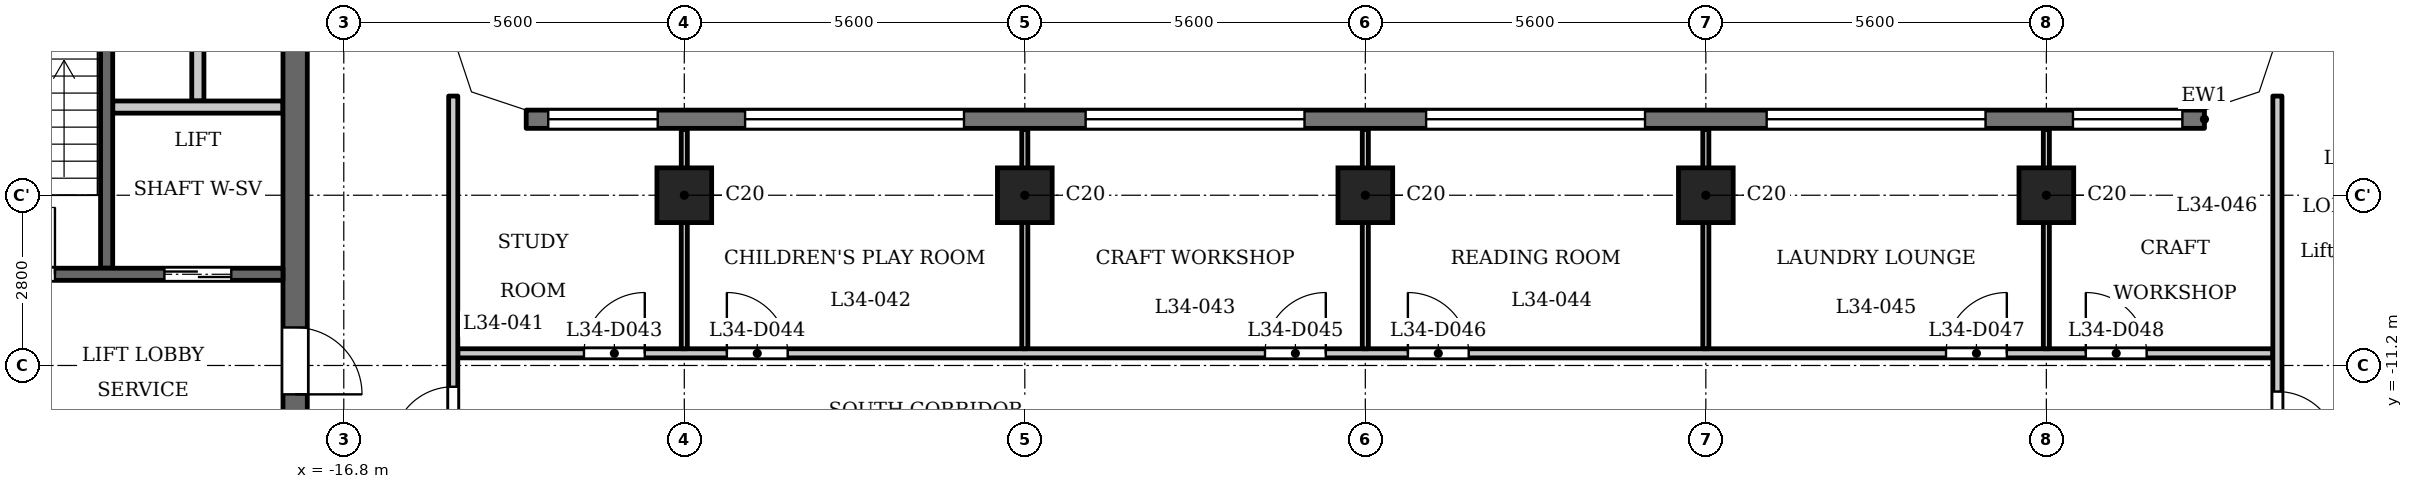
"""IFC4 building model, lengths in metres.
Left out: names, types, materials, properties, quantities, classifications, styles, units other than length and angle.
Written with IfcOpenShell. Run it as: python <this file> out.ifc"""

import sys

from ifc_helpers import new_model, si_unit, direction, frame, frame_2d, origin, origin_2d, place, context, subcontext, project, spatial, polyline, rectangle, outline, extrude, element, fill, save


model = new_model("IFC4")
c1 = context("Model", 3, precision=1e-05, world=origin(), true_north=direction((0.0, 1.0)))
c2 = subcontext(c1, "Body", "Model", "MODEL_VIEW")
j1 = project(units=[si_unit("LENGTHUNIT", "METRE"), si_unit("PLANEANGLEUNIT", "RADIAN")], contexts=[c1])
p1 = place(None, origin())
s1 = spatial("IfcSite", under=j1, at=p1, CompositionType="ELEMENT")
p2 = place(p1, origin())
s2 = spatial("IfcBuilding", under=s1, at=p2, CompositionType="ELEMENT")
p3 = place(p2, frame((0.0, 0.0, 136.1)))
s3 = spatial("IfcBuildingStorey", under=s2, at=p3, CompositionType="ELEMENT", Elevation=136.1)
for number, where, z_axis, x_axis in (
    (1, (-11.2, -8.4, 0.0), (0.0, 0.0, 1.0), (1.0, 0.0, 0.0)),
    (2, (-5.6, -8.4, 0.0), (0.0, 0.0, 1.0), (1.0, 0.0, 0.0)),
    (3, (0.0, -8.4, 0.0), (0.0, 0.0, 1.0), (1.0, 0.0, 0.0)),
    (4, (5.6, -8.4, 0.0), (0.0, 0.0, 1.0), (1.0, 0.0, 0.0)),
    (5, (11.2, -8.4, 0.0), (0.0, 0.0, 1.0), (1.0, 0.0, 0.0)),
):
    element("IfcColumn", number, at=place(p3, frame(where, z_axis=z_axis, x_axis=x_axis)), inside=s3, PredefinedType="COLUMN", context=c2, shape_type="SweptSolid", body=[
        extrude(rectangle(XDim=0.9, YDim=0.9, at=origin_2d()), origin(), (0.0, 0.0, 1.0), 3.5),
    ])
p4 = place(p3, frame((13.8, -7.15, 0.0), z_axis=(0.0, 0.0, 1.0), x_axis=(-1.0, 0.0, 0.0)))
e6 = element("IfcWall", 6, at=p4, inside=s3, PredefinedType="SOLIDWALL", context=c2, shape_type="SweptSolid", body=[
    extrude(rectangle(XDim=27.6, YDim=0.3, at=frame_2d((13.8, 0.0))), origin(), (0.0, 0.0, 1.0), 3.2),
])
p5 = place(p4, frame((0.363, 0.0, 0.9)))
e7 = element("IfcOpeningElement", 7, at=p5, cuts=e6, PredefinedType="OPENING", context=c2, shape_type="SweptSolid", body=[
    extrude(rectangle(XDim=1.8, YDim=1.25, at=frame_2d((0.9, 0.625))), frame((0.0, 0.16, 0.0), z_axis=(0.0, -1.0, 0.0), x_axis=(1.0, 0.0, 0.0)), (0.0, 0.0, 1.0), 0.32),
])
p6 = place(p4, frame((3.6, 0.0, 1.2)))
e8 = element("IfcOpeningElement", 8, at=p6, cuts=e6, PredefinedType="OPENING", context=c2, shape_type="SweptSolid", body=[
    extrude(rectangle(XDim=3.6, YDim=0.95, at=frame_2d((1.8, 0.475))), frame((0.0, 0.16, 0.0), z_axis=(0.0, -1.0, 0.0), x_axis=(1.0, 0.0, 0.0)), (0.0, 0.0, 1.0), 0.32),
])
p7 = place(p4, frame((9.2, 0.0, 1.2)))
e9 = element("IfcOpeningElement", 9, at=p7, cuts=e6, PredefinedType="OPENING", context=c2, shape_type="SweptSolid", body=[
    extrude(rectangle(XDim=3.6, YDim=0.95, at=frame_2d((1.8, 0.475))), frame((0.0, 0.16, 0.0), z_axis=(0.0, -1.0, 0.0), x_axis=(1.0, 0.0, 0.0)), (0.0, 0.0, 1.0), 0.32),
])
p8 = place(p4, frame((14.8, 0.0, 1.2)))
e10 = element("IfcOpeningElement", 10, at=p8, cuts=e6, PredefinedType="OPENING", context=c2, shape_type="SweptSolid", body=[
    extrude(rectangle(XDim=3.6, YDim=0.95, at=frame_2d((1.8, 0.475))), frame((0.0, 0.16, 0.0), z_axis=(0.0, -1.0, 0.0), x_axis=(1.0, 0.0, 0.0)), (0.0, 0.0, 1.0), 0.32),
])
p9 = place(p4, frame((20.4, 0.0, 1.2)))
e11 = element("IfcOpeningElement", 11, at=p9, cuts=e6, PredefinedType="OPENING", context=c2, shape_type="SweptSolid", body=[
    extrude(rectangle(XDim=3.6, YDim=0.95, at=frame_2d((1.8, 0.475))), frame((0.0, 0.16, 0.0), z_axis=(0.0, -1.0, 0.0), x_axis=(1.0, 0.0, 0.0)), (0.0, 0.0, 1.0), 0.32),
])
p10 = place(p4, frame((25.438, 0.0, 0.9)))
e12 = element("IfcOpeningElement", 12, at=p10, cuts=e6, PredefinedType="OPENING", context=c2, shape_type="SweptSolid", body=[
    extrude(rectangle(XDim=1.8, YDim=1.25, at=frame_2d((0.9, 0.625))), frame((0.0, 0.16, 0.0), z_axis=(0.0, -1.0, 0.0), x_axis=(1.0, 0.0, 0.0)), (0.0, 0.0, 1.0), 0.32),
])
p11 = place(p3, frame((-20.7, -9.6, 0.0), z_axis=(0.0, 0.0, 1.0), x_axis=(0.0, 1.0, 0.0)))
e13 = element("IfcWall", 13, at=p11, inside=s3, PredefinedType="SHEAR", context=c2, shape_type="SweptSolid", body=[
    extrude(rectangle(XDim=9.75, YDim=0.2, at=frame_2d((4.875, 0.0))), origin(), (0.0, 0.0, 1.0), 3.2),
])
p12 = place(p3, frame((-19.2, -6.85, 0.0), z_axis=(0.0, 0.0, 1.0), x_axis=(0.0, 1.0, 0.0)))
e14 = element("IfcWall", 14, at=p12, inside=s3, PredefinedType="PARTITIONING", context=c2, shape_type="SweptSolid", body=[
    extrude(rectangle(XDim=7.0, YDim=0.2, at=frame_2d((3.5, 0.0))), origin(), (0.0, 0.0, 1.0), 3.2),
])
p13 = place(p3, frame((-17.6, -12.45, 0.0), z_axis=(0.0, 0.0, 1.0), x_axis=(0.0, 1.0, 0.0)))
e15 = element("IfcWall", 15, at=p13, inside=s3, PredefinedType="SHEAR", context=c2, shape_type="SweptSolid", body=[
    extrude(rectangle(XDim=24.9, YDim=0.4, at=frame_2d((12.45, 0.0))), origin(), (0.0, 0.0, 1.0), 3.2),
])
p14 = place(p13, frame((8.65, 0.0, 0.0)))
e16 = element("IfcOpeningElement", 16, at=p14, cuts=e15, PredefinedType="OPENING", context=c2, shape_type="SweptSolid", body=[
    extrude(rectangle(XDim=0.9, YDim=2.1, at=frame_2d((0.45, 1.05))), frame((0.0, 0.21, 0.0), z_axis=(0.0, -1.0, 0.0), x_axis=(1.0, 0.0, 0.0)), (0.0, 0.0, 1.0), 0.42),
])
p15 = place(p13, frame((15.6, 0.0, 0.0)))
e17 = element("IfcOpeningElement", 17, at=p15, cuts=e15, PredefinedType="OPENING", context=c2, shape_type="SweptSolid", body=[
    extrude(rectangle(XDim=1.1, YDim=2.1, at=frame_2d((0.55, 1.05))), frame((0.0, 0.21, 0.0), z_axis=(0.0, -1.0, 0.0), x_axis=(1.0, 0.0, 0.0)), (0.0, 0.0, 1.0), 0.42),
])
p16 = place(p13, frame((18.0, 0.0, 0.0)))
e18 = element("IfcOpeningElement", 18, at=p16, cuts=e15, PredefinedType="OPENING", context=c2, shape_type="SweptSolid", body=[
    extrude(rectangle(XDim=1.1, YDim=2.1, at=frame_2d((0.55, 1.05))), frame((0.0, 0.21, 0.0), z_axis=(0.0, -1.0, 0.0), x_axis=(1.0, 0.0, 0.0)), (0.0, 0.0, 1.0), 0.42),
])
p17 = place(p13, frame((23.025, 0.0, 0.0)))
e19 = element("IfcOpeningElement", 19, at=p17, cuts=e15, PredefinedType="OPENING", context=c2, shape_type="SweptSolid", body=[
    extrude(rectangle(XDim=1.1, YDim=2.1, at=frame_2d((0.55, 1.05))), frame((0.0, 0.21, 0.0), z_axis=(0.0, -1.0, 0.0), x_axis=(1.0, 0.0, 0.0)), (0.0, 0.0, 1.0), 0.42),
])
p18 = place(p13, frame((0.775, 0.0, 0.0)))
e20 = element("IfcOpeningElement", 20, at=p18, cuts=e15, PredefinedType="OPENING", context=c2, shape_type="SweptSolid", body=[
    extrude(rectangle(XDim=1.1, YDim=2.1, at=frame_2d((0.55, 1.05))), frame((0.0, 0.21, 0.0), z_axis=(0.0, -1.0, 0.0), x_axis=(1.0, 0.0, 0.0)), (0.0, 0.0, 1.0), 0.42),
])
p19 = place(p13, frame((12.925, 0.0, 0.0)))
e21 = element("IfcOpeningElement", 21, at=p19, cuts=e15, PredefinedType="OPENING", context=c2, shape_type="SweptSolid", body=[
    extrude(rectangle(XDim=1.8, YDim=2.1, at=frame_2d((0.9, 1.05))), frame((0.0, 0.21, 0.0), z_axis=(0.0, -1.0, 0.0), x_axis=(1.0, 0.0, 0.0)), (0.0, 0.0, 1.0), 0.42),
])
p20 = place(p3, frame((-17.8, -9.7, 0.0), z_axis=(0.0, 0.0, 1.0), x_axis=(-1.0, 0.0, 0.0)))
e22 = element("IfcWall", 22, at=p20, inside=s3, PredefinedType="SHEAR", context=c2, shape_type="SweptSolid", body=[
    extrude(rectangle(XDim=8.45, YDim=0.2, at=frame_2d((4.225, 0.0))), origin(), (0.0, 0.0, 1.0), 3.2),
])
p21 = place(p20, frame((0.85, 0.0, 0.0)))
e23 = element("IfcOpeningElement", 23, at=p21, cuts=e22, PredefinedType="OPENING", context=c2, shape_type="SweptSolid", body=[
    extrude(rectangle(XDim=1.1, YDim=2.1, at=frame_2d((0.55, 1.05))), frame((0.0, 0.11, 0.0), z_axis=(0.0, -1.0, 0.0), x_axis=(1.0, 0.0, 0.0)), (0.0, 0.0, 1.0), 0.22),
])
p22 = place(p20, frame((3.75, 0.0, 0.0)))
e24 = element("IfcOpeningElement", 24, at=p22, cuts=e22, PredefinedType="OPENING", context=c2, shape_type="SweptSolid", body=[
    extrude(rectangle(XDim=1.1, YDim=2.1, at=frame_2d((0.55, 1.05))), frame((0.0, 0.11, 0.0), z_axis=(0.0, -1.0, 0.0), x_axis=(1.0, 0.0, 0.0)), (0.0, 0.0, 1.0), 0.22),
])
p23 = place(p3, frame((-17.8, -6.95, 0.0), z_axis=(0.0, 0.0, 1.0), x_axis=(-1.0, 0.0, 0.0)))
e25 = element("IfcWall", 25, at=p23, inside=s3, PredefinedType="PARTITIONING", context=c2, shape_type="SweptSolid", body=[
    extrude(rectangle(XDim=2.8, YDim=0.2, at=frame_2d((1.4, 0.0))), origin(), (0.0, 0.0, 1.0), 3.2),
])
p24 = place(p3, frame((-14.925, -11.0, 0.0), z_axis=(0.0, 0.0, 1.0), x_axis=(1.0, 0.0, 0.0)))
e26 = element("IfcWall", 26, at=p24, inside=s3, PredefinedType="PARTITIONING", context=c2, shape_type="SweptSolid", body=[
    extrude(rectangle(XDim=29.85, YDim=0.15, at=frame_2d((14.925, 0.0))), origin(), (0.0, 0.0, 1.0), 3.2),
])
p25 = place(p24, frame((2.075, 0.0, 0.0)))
e27 = element("IfcOpeningElement", 27, at=p25, cuts=e26, PredefinedType="OPENING", context=c2, shape_type="SweptSolid", body=[
    extrude(rectangle(XDim=1.0, YDim=2.1, at=frame_2d((0.5, 1.05))), frame((0.0, 0.085, 0.0), z_axis=(0.0, -1.0, 0.0), x_axis=(1.0, 0.0, 0.0)), (0.0, 0.0, 1.0), 0.17),
])
p26 = place(p24, frame((4.425, 0.0, 0.0)))
e28 = element("IfcOpeningElement", 28, at=p26, cuts=e26, PredefinedType="OPENING", context=c2, shape_type="SweptSolid", body=[
    extrude(rectangle(XDim=1.0, YDim=2.1, at=frame_2d((0.5, 1.05))), frame((0.0, 0.085, 0.0), z_axis=(0.0, -1.0, 0.0), x_axis=(1.0, 0.0, 0.0)), (0.0, 0.0, 1.0), 0.17),
])
p27 = place(p24, frame((13.275, 0.0, 0.0)))
e29 = element("IfcOpeningElement", 29, at=p27, cuts=e26, PredefinedType="OPENING", context=c2, shape_type="SweptSolid", body=[
    extrude(rectangle(XDim=1.0, YDim=2.1, at=frame_2d((0.5, 1.05))), frame((0.0, 0.085, 0.0), z_axis=(0.0, -1.0, 0.0), x_axis=(1.0, 0.0, 0.0)), (0.0, 0.0, 1.0), 0.17),
])
p28 = place(p24, frame((15.625, 0.0, 0.0)))
e30 = element("IfcOpeningElement", 30, at=p28, cuts=e26, PredefinedType="OPENING", context=c2, shape_type="SweptSolid", body=[
    extrude(rectangle(XDim=1.0, YDim=2.1, at=frame_2d((0.5, 1.05))), frame((0.0, 0.085, 0.0), z_axis=(0.0, -1.0, 0.0), x_axis=(1.0, 0.0, 0.0)), (0.0, 0.0, 1.0), 0.17),
])
p29 = place(p24, frame((24.475, 0.0, 0.0)))
e31 = element("IfcOpeningElement", 31, at=p29, cuts=e26, PredefinedType="OPENING", context=c2, shape_type="SweptSolid", body=[
    extrude(rectangle(XDim=1.0, YDim=2.1, at=frame_2d((0.5, 1.05))), frame((0.0, 0.085, 0.0), z_axis=(0.0, -1.0, 0.0), x_axis=(1.0, 0.0, 0.0)), (0.0, 0.0, 1.0), 0.17),
])
p30 = place(p24, frame((26.774, 0.0, 0.0)))
e32 = element("IfcOpeningElement", 32, at=p30, cuts=e26, PredefinedType="OPENING", context=c2, shape_type="SweptSolid", body=[
    extrude(rectangle(XDim=1.0, YDim=2.1, at=frame_2d((0.5, 1.05))), frame((0.0, 0.085, 0.0), z_axis=(0.0, -1.0, 0.0), x_axis=(1.0, 0.0, 0.0)), (0.0, 0.0, 1.0), 0.17),
])
p31 = place(p3, frame((-15.0, -13.125, 0.0), z_axis=(0.0, 0.0, 1.0), x_axis=(0.0, 1.0, 0.0)))
e33 = element("IfcWall", 33, at=p31, inside=s3, PredefinedType="PARTITIONING", context=c2, shape_type="SweptSolid", body=[
    extrude(rectangle(XDim=6.356, YDim=0.15, at=frame_2d((3.178, 0.0))), origin(), (0.0, 0.0, 1.0), 3.2),
])
p32 = place(p31, frame((0.575, 0.0, 0.0)))
e34 = element("IfcOpeningElement", 34, at=p32, cuts=e33, PredefinedType="OPENING", context=c2, shape_type="SweptSolid", body=[
    extrude(rectangle(XDim=1.0, YDim=2.1, at=frame_2d((0.5, 1.05))), frame((0.0, 0.085, 0.0), z_axis=(0.0, -1.0, 0.0), x_axis=(1.0, 0.0, 0.0)), (0.0, 0.0, 1.0), 0.17),
])
for number, where, z_axis, x_axis in (
    (35, (-11.2, -10.925, 0.0), (0.0, 0.0, 1.0), (0.0, 1.0, 0.0)),
    (36, (-5.6, -10.925, 0.0), (0.0, 0.0, 1.0), (0.0, 1.0, 0.0)),
    (37, (0.0, -10.925, 0.0), (0.0, 0.0, 1.0), (0.0, 1.0, 0.0)),
    (38, (5.6, -10.925, 0.0), (0.0, 0.0, 1.0), (0.0, 1.0, 0.0)),
    (39, (11.2, -10.925, 0.0), (0.0, 0.0, 1.0), (0.0, 1.0, 0.0)),
):
    element("IfcWall", number, at=place(p3, frame(where, z_axis=z_axis, x_axis=x_axis)), inside=s3, PredefinedType="PARTITIONING", context=c2, shape_type="SweptSolid", body=[
        extrude(rectangle(XDim=3.605, YDim=0.1, at=frame_2d((1.802, 0.0))), origin(), (0.0, 0.0, 1.0), 3.2),
    ])
p33 = place(p3, frame((15.0, -13.125, 0.0), z_axis=(0.0, 0.0, 1.0), x_axis=(0.0, 1.0, 0.0)))
e40 = element("IfcWall", 40, at=p33, inside=s3, PredefinedType="PARTITIONING", context=c2, shape_type="SweptSolid", body=[
    extrude(rectangle(XDim=6.356, YDim=0.15, at=frame_2d((3.178, 0.0))), origin(), (0.0, 0.0, 1.0), 3.2),
])
p34 = place(p33, frame((0.496, 0.0, 0.0)))
e41 = element("IfcOpeningElement", 41, at=p34, cuts=e40, PredefinedType="OPENING", context=c2, shape_type="SweptSolid", body=[
    extrude(rectangle(XDim=1.0, YDim=2.1, at=frame_2d((0.5, 1.05))), frame((0.0, 0.085, 0.0), z_axis=(0.0, -1.0, 0.0), x_axis=(1.0, 0.0, 0.0)), (0.0, 0.0, 1.0), 0.17),
])
p35 = place(p3, origin())
e42 = element("IfcWall", 42, at=p35, inside=s3, PredefinedType="SOLIDWALL", context=c2, shape_type="SweptSolid", body=[
    extrude(outline(polyline([(14.937, -6.937), (15.3, -5.849), (15.3, -5.8), (15.0, -5.8), (14.7, -6.7), (13.8, -7.0), (13.8, -7.3), (13.849, -7.3), (14.937, -6.937)])), origin(), (0.0, 0.0, 1.0), 3.2),
])
e43 = element("IfcWall", 43, at=p35, inside=s3, PredefinedType="SOLIDWALL", context=c2, shape_type="SweptSolid", body=[
    extrude(outline(polyline([(-14.937, -6.937), (-13.849, -7.3), (-13.8, -7.3), (-13.8, -7.0), (-14.7, -6.7), (-15.0, -5.8), (-15.3, -5.8), (-15.3, -5.849), (-14.937, -6.937)])), origin(), (0.0, 0.0, 1.0), 3.2),
])
p36 = place(p21, origin())
e44 = element("IfcDoor", 44, at=p36, inside=s3, OperationType="DOUBLE_DOOR_SLIDING", PredefinedType="DOOR", context=c2, shape_type="SweptSolid", body=[
    extrude(rectangle(XDim=1.1, YDim=2.1, at=frame_2d((0.55, 1.05))), frame((0.0, 0.025, 0.0), z_axis=(0.0, -1.0, 0.0), x_axis=(1.0, 0.0, 0.0)), (0.0, 0.0, 1.0), 0.05),
])
fill(e23, e44)
p37 = place(p18, origin())
e45 = element("IfcDoor", 45, at=p37, inside=s3, OperationType="SINGLE_SWING_LEFT", PredefinedType="DOOR", context=c2, shape_type="SweptSolid", body=[
    extrude(rectangle(XDim=1.1, YDim=2.1, at=frame_2d((0.55, 1.05))), frame((0.0, 0.025, 0.0), z_axis=(0.0, -1.0, 0.0), x_axis=(1.0, 0.0, 0.0)), (0.0, 0.0, 1.0), 0.05),
])
fill(e20, e45)
p38 = place(p22, origin())
e46 = element("IfcDoor", 46, at=p38, inside=s3, OperationType="SINGLE_SWING_LEFT", PredefinedType="DOOR", context=c2, shape_type="SweptSolid", body=[
    extrude(rectangle(XDim=1.1, YDim=2.1, at=frame_2d((0.55, 1.05))), frame((0.0, 0.025, 0.0), z_axis=(0.0, -1.0, 0.0), x_axis=(1.0, 0.0, 0.0)), (0.0, 0.0, 1.0), 0.05),
])
fill(e24, e46)
p39 = place(p32, origin())
e47 = element("IfcDoor", 47, at=p39, inside=s3, OperationType="SINGLE_SWING_RIGHT", PredefinedType="DOOR", context=c2, shape_type="SweptSolid", body=[
    extrude(rectangle(XDim=1.0, YDim=2.1, at=frame_2d((0.5, 1.05))), frame((0.0, 0.025, 0.0), z_axis=(0.0, -1.0, 0.0), x_axis=(1.0, 0.0, 0.0)), (0.0, 0.0, 1.0), 0.05),
])
fill(e34, e47)
p40 = place(p34, origin())
e48 = element("IfcDoor", 48, at=p40, inside=s3, OperationType="SINGLE_SWING_LEFT", PredefinedType="DOOR", context=c2, shape_type="SweptSolid", body=[
    extrude(rectangle(XDim=1.0, YDim=2.1, at=frame_2d((0.5, 1.05))), frame((0.0, 0.025, 0.0), z_axis=(0.0, -1.0, 0.0), x_axis=(1.0, 0.0, 0.0)), (0.0, 0.0, 1.0), 0.05),
])
fill(e41, e48)
p41 = place(p25, origin())
e49 = element("IfcDoor", 49, at=p41, inside=s3, OperationType="SINGLE_SWING_LEFT", PredefinedType="DOOR", context=c2, shape_type="SweptSolid", body=[
    extrude(rectangle(XDim=1.0, YDim=2.1, at=frame_2d((0.5, 1.05))), frame((0.0, 0.025, 0.0), z_axis=(0.0, -1.0, 0.0), x_axis=(1.0, 0.0, 0.0)), (0.0, 0.0, 1.0), 0.05),
])
fill(e27, e49)
p42 = place(p26, origin())
e50 = element("IfcDoor", 50, at=p42, inside=s3, OperationType="SINGLE_SWING_RIGHT", PredefinedType="DOOR", context=c2, shape_type="SweptSolid", body=[
    extrude(rectangle(XDim=1.0, YDim=2.1, at=frame_2d((0.5, 1.05))), frame((0.0, 0.025, 0.0), z_axis=(0.0, -1.0, 0.0), x_axis=(1.0, 0.0, 0.0)), (0.0, 0.0, 1.0), 0.05),
])
fill(e28, e50)
p43 = place(p27, origin())
e51 = element("IfcDoor", 51, at=p43, inside=s3, OperationType="SINGLE_SWING_LEFT", PredefinedType="DOOR", context=c2, shape_type="SweptSolid", body=[
    extrude(rectangle(XDim=1.0, YDim=2.1, at=frame_2d((0.5, 1.05))), frame((0.0, 0.025, 0.0), z_axis=(0.0, -1.0, 0.0), x_axis=(1.0, 0.0, 0.0)), (0.0, 0.0, 1.0), 0.05),
])
fill(e29, e51)
p44 = place(p28, origin())
e52 = element("IfcDoor", 52, at=p44, inside=s3, OperationType="SINGLE_SWING_RIGHT", PredefinedType="DOOR", context=c2, shape_type="SweptSolid", body=[
    extrude(rectangle(XDim=1.0, YDim=2.1, at=frame_2d((0.5, 1.05))), frame((0.0, 0.025, 0.0), z_axis=(0.0, -1.0, 0.0), x_axis=(1.0, 0.0, 0.0)), (0.0, 0.0, 1.0), 0.05),
])
fill(e30, e52)
p45 = place(p29, origin())
e53 = element("IfcDoor", 53, at=p45, inside=s3, OperationType="SINGLE_SWING_LEFT", PredefinedType="DOOR", context=c2, shape_type="SweptSolid", body=[
    extrude(rectangle(XDim=1.0, YDim=2.1, at=frame_2d((0.5, 1.05))), frame((0.0, 0.025, 0.0), z_axis=(0.0, -1.0, 0.0), x_axis=(1.0, 0.0, 0.0)), (0.0, 0.0, 1.0), 0.05),
])
fill(e31, e53)
p46 = place(p30, origin())
e54 = element("IfcDoor", 54, at=p46, inside=s3, OperationType="SINGLE_SWING_RIGHT", PredefinedType="DOOR", context=c2, shape_type="SweptSolid", body=[
    extrude(rectangle(XDim=1.0, YDim=2.1, at=frame_2d((0.5, 1.05))), frame((0.0, 0.025, 0.0), z_axis=(0.0, -1.0, 0.0), x_axis=(1.0, 0.0, 0.0)), (0.0, 0.0, 1.0), 0.05),
])
fill(e32, e54)
p47 = place(p5, origin())
e55 = element("IfcWindow", 55, at=p47, inside=s3, PartitioningType="SINGLE_PANEL", PredefinedType="WINDOW", context=c2, shape_type="SweptSolid", body=[
    extrude(rectangle(XDim=1.8, YDim=1.25, at=frame_2d((0.9, 0.625))), frame((0.0, 0.03, 0.0), z_axis=(0.0, -1.0, 0.0), x_axis=(1.0, 0.0, 0.0)), (0.0, 0.0, 1.0), 0.06),
])
fill(e7, e55)
p48 = place(p6, origin())
e56 = element("IfcWindow", 56, at=p48, inside=s3, PartitioningType="SINGLE_PANEL", PredefinedType="WINDOW", context=c2, shape_type="SweptSolid", body=[
    extrude(rectangle(XDim=3.6, YDim=0.95, at=frame_2d((1.8, 0.475))), frame((0.0, 0.03, 0.0), z_axis=(0.0, -1.0, 0.0), x_axis=(1.0, 0.0, 0.0)), (0.0, 0.0, 1.0), 0.06),
])
fill(e8, e56)
p49 = place(p7, origin())
e57 = element("IfcWindow", 57, at=p49, inside=s3, PartitioningType="SINGLE_PANEL", PredefinedType="WINDOW", context=c2, shape_type="SweptSolid", body=[
    extrude(rectangle(XDim=3.6, YDim=0.95, at=frame_2d((1.8, 0.475))), frame((0.0, 0.03, 0.0), z_axis=(0.0, -1.0, 0.0), x_axis=(1.0, 0.0, 0.0)), (0.0, 0.0, 1.0), 0.06),
])
fill(e9, e57)
p50 = place(p8, origin())
e58 = element("IfcWindow", 58, at=p50, inside=s3, PartitioningType="SINGLE_PANEL", PredefinedType="WINDOW", context=c2, shape_type="SweptSolid", body=[
    extrude(rectangle(XDim=3.6, YDim=0.95, at=frame_2d((1.8, 0.475))), frame((0.0, 0.03, 0.0), z_axis=(0.0, -1.0, 0.0), x_axis=(1.0, 0.0, 0.0)), (0.0, 0.0, 1.0), 0.06),
])
fill(e10, e58)
p51 = place(p9, origin())
e59 = element("IfcWindow", 59, at=p51, inside=s3, PartitioningType="SINGLE_PANEL", PredefinedType="WINDOW", context=c2, shape_type="SweptSolid", body=[
    extrude(rectangle(XDim=3.6, YDim=0.95, at=frame_2d((1.8, 0.475))), frame((0.0, 0.03, 0.0), z_axis=(0.0, -1.0, 0.0), x_axis=(1.0, 0.0, 0.0)), (0.0, 0.0, 1.0), 0.06),
])
fill(e11, e59)
p52 = place(p10, origin())
e60 = element("IfcWindow", 60, at=p52, inside=s3, PartitioningType="SINGLE_PANEL", PredefinedType="WINDOW", context=c2, shape_type="SweptSolid", body=[
    extrude(rectangle(XDim=1.8, YDim=1.25, at=frame_2d((0.9, 0.625))), frame((0.0, 0.03, 0.0), z_axis=(0.0, -1.0, 0.0), x_axis=(1.0, 0.0, 0.0)), (0.0, 0.0, 1.0), 0.06),
])
fill(e12, e60)
save(model, sys.argv[1])
